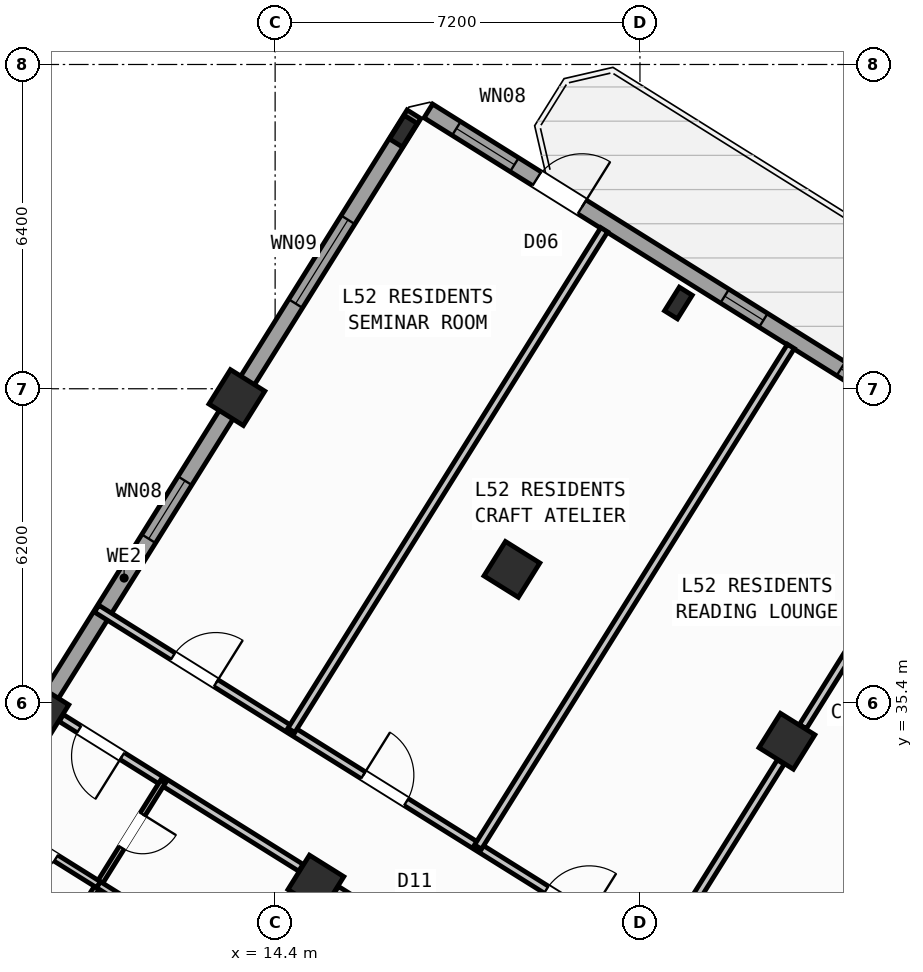
"""IFC4 building model, lengths in metres.
Left out: names, types, materials, properties, quantities, classifications, styles, units other than length and angle.
Written with IfcOpenShell. Run it as: python <this file> out.ifc"""

import sys

from ifc_helpers import new_model, si_unit, direction, frame, frame_2d, origin, origin_2d, place, context, subcontext, project, spatial, rectangle, hollow_rectangle, i_section, extrude, source, transform, mapped, element, fill, save


model = new_model("IFC4")
c1 = context("Model", 3, precision=1e-05, world=origin(), true_north=direction((0.0, 1.0)))
c2 = subcontext(c1, "Body", "Model", "MODEL_VIEW")
j1 = project(units=[si_unit("LENGTHUNIT", "METRE"), si_unit("PLANEANGLEUNIT", "RADIAN")], contexts=[c1])
p1 = place(None, origin())
s1 = spatial("IfcSite", under=j1, at=p1, CompositionType="ELEMENT")
p2 = place(p1, origin())
s2 = spatial("IfcBuilding", under=s1, at=p2, CompositionType="ELEMENT")
p3 = place(p2, frame((0.0, 0.0, 207.6)))
s3 = spatial("IfcBuildingStorey", under=s2, at=p3, CompositionType="ELEMENT", Elevation=207.6)
m1 = source(origin(), c2, "Body", "SweptSolid", [
    extrude(hollow_rectangle(XDim=0.8, YDim=0.8, WallThickness=0.032, at=origin_2d()), origin(), (0.0, 0.0, 1.0), 3.6),
])
p4 = place(p3, frame((24.5, 34.643, 0.0), z_axis=(0.0, 0.0, 1.0), x_axis=(-0.848048096156, 0.529919264233, 0.0)))
e1 = element("IfcColumn", 1, at=p4, inside=s3, PredefinedType="COLUMN", context=c2, shape_type="MappedRepresentation", body=[
    mapped(m1, transform((0.0, 0.0, 0.0), scale=1.0)),
])
m2 = source(origin(), c2, "Body", "SweptSolid", [
    extrude(i_section(OverallWidth=0.3, OverallDepth=0.55, WebThickness=0.015, FlangeThickness=0.029, at=origin_2d()), origin(), (0.0, 0.0, 1.0), 3.6),
])
p5 = place(p3, frame((22.358, 43.292, 0.0), z_axis=(0.0, 0.0, 1.0), x_axis=(-0.848048096156, 0.529919264233, 0.0)))
e2 = element("IfcColumn", 2, at=p5, inside=s3, PredefinedType="COLUMN", context=c2, shape_type="MappedRepresentation", body=[
    mapped(m2, transform((0.0, 0.0, 0.0), scale=1.0)),
])
for number, where, z_axis, x_axis in (
    (3, (19.073, 38.034, 0.0), (0.0, 0.0, 1.0), (-0.848, 0.53, 0.0)),
    (4, (15.205, 31.844, 0.0), (0.0, 0.0, 1.0), (-0.848, 0.53, 0.0)),
):
    element("IfcColumn", number, at=place(p3, frame(where, z_axis=z_axis, x_axis=x_axis)), inside=s3, PredefinedType="COLUMN", context=c2, shape_type="MappedRepresentation", body=[
        mapped(m1, transform((0.0, 0.0, 0.0), scale=1.0)),
    ])
p6 = place(p3, frame((16.931, 46.684, 0.0), z_axis=(0.0, 0.0, 1.0), x_axis=(-0.848048096156, 0.529919264233, 0.0)))
e5 = element("IfcColumn", 5, at=p6, inside=s3, PredefinedType="COLUMN", context=c2, shape_type="MappedRepresentation", body=[
    mapped(m2, transform((0.0, 0.0, 0.0), scale=1.0)),
])
for number, where, z_axis, x_axis in (
    (6, (13.646, 41.426, 0.0), (0.0, 0.0, 1.0), (-0.848, 0.53, 0.0)),
    (7, (9.777, 35.235, 0.0), (0.0, 0.0, 1.0), (-0.848, 0.53, 0.0)),
):
    element("IfcColumn", number, at=place(p3, frame(where, z_axis=z_axis, x_axis=x_axis)), inside=s3, PredefinedType="COLUMN", context=c2, shape_type="MappedRepresentation", body=[
        mapped(m1, transform((0.0, 0.0, 0.0), scale=1.0)),
    ])
p7 = place(p3, frame((5.7, 28.71, 0.0), z_axis=(0.0, 0.0, 1.0), x_axis=(0.529923711467, 0.8480453172, 0.0)))
e8 = element("IfcWall", 8, at=p7, inside=s3, PredefinedType="STANDARD", context=c2, shape_type="SweptSolid", body=[
    extrude(rectangle(XDim=21.587, YDim=0.32, at=frame_2d((10.794, 0.0))), origin(), (0.0, 0.0, 1.0), 2.825),
])
p8 = place(p7, frame((2.184, 0.0, 0.9)))
e9 = element("IfcOpeningElement", 9, at=p8, cuts=e8, PredefinedType="OPENING", context=c2, shape_type="SweptSolid", body=[
    extrude(rectangle(XDim=1.65, YDim=1.45, at=frame_2d((0.825, 0.725))), frame((0.0, 0.17, 0.0), z_axis=(0.0, -1.0, 0.0), x_axis=(1.0, 0.0, 0.0)), (0.0, 0.0, 1.0), 0.34),
])
p9 = place(p7, frame((11.709, 0.0, 0.9)))
e10 = element("IfcOpeningElement", 10, at=p9, cuts=e8, PredefinedType="OPENING", context=c2, shape_type="SweptSolid", body=[
    extrude(rectangle(XDim=1.35, YDim=1.45, at=frame_2d((0.675, 0.725))), frame((0.0, 0.17, 0.0), z_axis=(0.0, -1.0, 0.0), x_axis=(1.0, 0.0, 0.0)), (0.0, 0.0, 1.0), 0.34),
])
p10 = place(p7, frame((17.181, 0.0, 0.95)))
e11 = element("IfcOpeningElement", 11, at=p10, cuts=e8, PredefinedType="OPENING", context=c2, shape_type="SweptSolid", body=[
    extrude(rectangle(XDim=1.95, YDim=1.35, at=frame_2d((0.975, 0.675))), frame((0.0, 0.17, 0.0), z_axis=(0.0, -1.0, 0.0), x_axis=(1.0, 0.0, 0.0)), (0.0, 0.0, 1.0), 0.34),
])
p11 = place(p3, frame((17.424, 47.083, 0.0), z_axis=(0.0, 0.0, 1.0), x_axis=(0.848049927979, -0.529916332693, 0.0)))
e12 = element("IfcWall", 12, at=p11, inside=s3, PredefinedType="STANDARD", context=c2, shape_type="SweptSolid", body=[
    extrude(rectangle(XDim=29.223, YDim=0.32, at=frame_2d((14.612, 0.0))), origin(), (0.0, 0.0, 1.0), 3.35),
])
p12 = place(p11, frame((2.526, 0.0, 0.0)))
e13 = element("IfcOpeningElement", 13, at=p12, cuts=e12, PredefinedType="OPENING", context=c2, shape_type="SweptSolid", body=[
    extrude(rectangle(XDim=1.05, YDim=2.15, at=frame_2d((0.525, 1.075))), frame((0.0, 0.17, 0.0), z_axis=(0.0, -1.0, 0.0), x_axis=(1.0, 0.0, 0.0)), (0.0, 0.0, 1.0), 0.34),
])
p13 = place(p11, frame((0.653, 0.0, 0.9)))
e14 = element("IfcOpeningElement", 14, at=p13, cuts=e12, PredefinedType="OPENING", context=c2, shape_type="SweptSolid", body=[
    extrude(rectangle(XDim=1.35, YDim=1.45, at=frame_2d((0.675, 0.725))), frame((0.0, 0.17, 0.0), z_axis=(0.0, -1.0, 0.0), x_axis=(1.0, 0.0, 0.0)), (0.0, 0.0, 1.0), 0.34),
])
p14 = place(p11, frame((6.897, 0.0, 1.0)))
e15 = element("IfcOpeningElement", 15, at=p14, cuts=e12, PredefinedType="OPENING", context=c2, shape_type="SweptSolid", body=[
    extrude(rectangle(XDim=0.9, YDim=1.25, at=frame_2d((0.45, 0.625))), frame((0.0, 0.17, 0.0), z_axis=(0.0, -1.0, 0.0), x_axis=(1.0, 0.0, 0.0)), (0.0, 0.0, 1.0), 0.34),
])
p15 = place(p11, frame((9.602, 0.0, 0.95)))
e16 = element("IfcOpeningElement", 16, at=p15, cuts=e12, PredefinedType="OPENING", context=c2, shape_type="SweptSolid", body=[
    extrude(rectangle(XDim=1.95, YDim=1.35, at=frame_2d((0.975, 0.675))), frame((0.0, 0.17, 0.0), z_axis=(0.0, -1.0, 0.0), x_axis=(1.0, 0.0, 0.0)), (0.0, 0.0, 1.0), 0.34),
])
p16 = place(p11, frame((14.096, 0.0, 1.0)))
e17 = element("IfcOpeningElement", 17, at=p16, cuts=e12, PredefinedType="OPENING", context=c2, shape_type="SweptSolid", body=[
    extrude(rectangle(XDim=0.9, YDim=1.25, at=frame_2d((0.45, 0.625))), frame((0.0, 0.17, 0.0), z_axis=(0.0, -1.0, 0.0), x_axis=(1.0, 0.0, 0.0)), (0.0, 0.0, 1.0), 0.34),
])
p17 = place(p11, frame((17.254, 0.0, 1.0)))
e18 = element("IfcOpeningElement", 18, at=p17, cuts=e12, PredefinedType="OPENING", context=c2, shape_type="SweptSolid", body=[
    extrude(rectangle(XDim=0.9, YDim=1.25, at=frame_2d((0.45, 0.625))), frame((0.0, 0.17, 0.0), z_axis=(0.0, -1.0, 0.0), x_axis=(1.0, 0.0, 0.0)), (0.0, 0.0, 1.0), 0.34),
])
p18 = place(p11, frame((21.139, 0.0, 0.9)))
e19 = element("IfcOpeningElement", 19, at=p18, cuts=e12, PredefinedType="OPENING", context=c2, shape_type="SweptSolid", body=[
    extrude(rectangle(XDim=1.35, YDim=1.45, at=frame_2d((0.675, 0.725))), frame((0.0, 0.17, 0.0), z_axis=(0.0, -1.0, 0.0), x_axis=(1.0, 0.0, 0.0)), (0.0, 0.0, 1.0), 0.34),
])
p19 = place(p11, frame((25.778, 0.0, 0.9)))
e20 = element("IfcOpeningElement", 20, at=p19, cuts=e12, PredefinedType="OPENING", context=c2, shape_type="SweptSolid", body=[
    extrude(rectangle(XDim=1.35, YDim=1.45, at=frame_2d((0.675, 0.725))), frame((0.0, 0.17, 0.0), z_axis=(0.0, -1.0, 0.0), x_axis=(1.0, 0.0, 0.0)), (0.0, 0.0, 1.0), 0.34),
])
p20 = place(p3, frame((31.239, 38.274, 0.0), z_axis=(0.0, 0.0, 1.0), x_axis=(-0.529925472745, -0.848044216616, 0.0)))
e21 = element("IfcWall", 21, at=p20, inside=s3, PredefinedType="PARTITIONING", context=c2, shape_type="SweptSolid", body=[
    extrude(rectangle(XDim=11.65, YDim=0.16, at=frame_2d((5.825, 0.0))), origin(), (0.0, 0.0, 1.0), 3.34),
])
p21 = place(p3, frame((25.065, 28.394, 0.0), z_axis=(0.0, 0.0, 1.0), x_axis=(-0.848048310262, 0.529918921593, 0.0)))
e22 = element("IfcWall", 22, at=p21, inside=s3, PredefinedType="PARTITIONING", context=c2, shape_type="SweptSolid", body=[
    extrude(rectangle(XDim=16.73, YDim=0.16, at=frame_2d((8.365, 0.0))), origin(), (0.0, 0.0, 1.0), 3.34),
])
p22 = place(p21, frame((1.338, 0.0, 0.0)))
e23 = element("IfcOpeningElement", 23, at=p22, cuts=e22, PredefinedType="OPENING", context=c2, shape_type="SweptSolid", body=[
    extrude(rectangle(XDim=1.0, YDim=2.1, at=frame_2d((0.5, 1.05))), frame((0.0, 0.09, 0.0), z_axis=(0.0, -1.0, 0.0), x_axis=(1.0, 0.0, 0.0)), (0.0, 0.0, 1.0), 0.18),
])
p23 = place(p21, frame((5.265, 0.0, 0.0)))
e24 = element("IfcOpeningElement", 24, at=p23, cuts=e22, PredefinedType="OPENING", context=c2, shape_type="SweptSolid", body=[
    extrude(rectangle(XDim=1.0, YDim=2.1, at=frame_2d((0.5, 1.05))), frame((0.0, 0.09, 0.0), z_axis=(0.0, -1.0, 0.0), x_axis=(1.0, 0.0, 0.0)), (0.0, 0.0, 1.0), 0.18),
])
p24 = place(p21, frame((9.526, 0.0, 0.0)))
e25 = element("IfcOpeningElement", 25, at=p24, cuts=e22, PredefinedType="OPENING", context=c2, shape_type="SweptSolid", body=[
    extrude(rectangle(XDim=1.0, YDim=2.1, at=frame_2d((0.5, 1.05))), frame((0.0, 0.09, 0.0), z_axis=(0.0, -1.0, 0.0), x_axis=(1.0, 0.0, 0.0)), (0.0, 0.0, 1.0), 0.18),
])
p25 = place(p21, frame((13.954, 0.0, 0.0)))
e26 = element("IfcOpeningElement", 26, at=p25, cuts=e22, PredefinedType="OPENING", context=c2, shape_type="SweptSolid", body=[
    extrude(rectangle(XDim=1.0, YDim=2.1, at=frame_2d((0.5, 1.05))), frame((0.0, 0.09, 0.0), z_axis=(0.0, -1.0, 0.0), x_axis=(1.0, 0.0, 0.0)), (0.0, 0.0, 1.0), 0.18),
])
p26 = place(p3, frame((20.336, 28.755, 0.0), z_axis=(0.0, 0.0, 1.0), x_axis=(-0.848049955116, 0.529916289265, 0.0)))
e27 = element("IfcWall", 27, at=p26, inside=s3, PredefinedType="PARTITIONING", context=c2, shape_type="SweptSolid", body=[
    extrude(rectangle(XDim=5.576, YDim=0.16, at=frame_2d((2.788, 0.0))), origin(), (0.0, 0.0, 1.0), 2.825),
])
p27 = place(p26, frame((3.618, 0.0, 0.0)))
e28 = element("IfcOpeningElement", 28, at=p27, cuts=e27, PredefinedType="OPENING", context=c2, shape_type="SweptSolid", body=[
    extrude(rectangle(XDim=1.0, YDim=2.1, at=frame_2d((0.5, 1.05))), frame((0.0, 0.09, 0.0), z_axis=(0.0, -1.0, 0.0), x_axis=(1.0, 0.0, 0.0)), (0.0, 0.0, 1.0), 0.18),
])
p28 = place(p3, frame((14.908, 32.147, 0.0), z_axis=(0.0, 0.0, 1.0), x_axis=(-0.848049955116, 0.529916289265, 0.0)))
e29 = element("IfcWall", 29, at=p28, inside=s3, PredefinedType="PARTITIONING", context=c2, shape_type="SweptSolid", body=[
    extrude(rectangle(XDim=5.576, YDim=0.16, at=frame_2d((2.788, 0.0))), origin(), (0.0, 0.0, 1.0), 2.825),
])
p29 = place(p28, frame((4.158, 0.0, 0.0)))
e30 = element("IfcOpeningElement", 30, at=p29, cuts=e29, PredefinedType="OPENING", context=c2, shape_type="SweptSolid", body=[
    extrude(rectangle(XDim=1.0, YDim=2.1, at=frame_2d((0.5, 1.05))), frame((0.0, 0.09, 0.0), z_axis=(0.0, -1.0, 0.0), x_axis=(1.0, 0.0, 0.0)), (0.0, 0.0, 1.0), 0.18),
])
p30 = place(p3, frame((12.188, 33.847, 0.0), z_axis=(0.0, 0.0, 1.0), x_axis=(-0.529917860021, -0.848048973604, 0.0)))
e31 = element("IfcWall", 31, at=p30, inside=s3, PredefinedType="PARTITIONING", context=c2, shape_type="SweptSolid", body=[
    extrude(rectangle(XDim=8.12, YDim=0.11, at=frame_2d((4.06, 0.0))), origin(), (0.0, 0.0, 1.0), 3.34),
])
p31 = place(p30, frame((0.76, 0.0, 0.0)))
e32 = element("IfcOpeningElement", 32, at=p31, cuts=e31, PredefinedType="OPENING", context=c2, shape_type="SweptSolid", body=[
    extrude(rectangle(XDim=0.78, YDim=2.05, at=frame_2d((0.39, 1.025))), frame((0.0, 0.065, 0.0), z_axis=(0.0, -1.0, 0.0), x_axis=(1.0, 0.0, 0.0)), (0.0, 0.0, 1.0), 0.13),
])
p32 = place(p30, frame((4.8, 0.0, 0.0)))
e33 = element("IfcOpeningElement", 33, at=p32, cuts=e31, PredefinedType="OPENING", context=c2, shape_type="SweptSolid", body=[
    extrude(rectangle(XDim=0.92, YDim=2.08, at=frame_2d((0.46, 1.04))), frame((0.0, 0.065, 0.0), z_axis=(0.0, -1.0, 0.0), x_axis=(1.0, 0.0, 0.0)), (0.0, 0.0, 1.0), 0.13),
])
p33 = place(p3, frame((10.916, 31.811, 0.0), z_axis=(0.0, 0.0, 1.0), x_axis=(-0.84802195137, 0.529961102341, 0.0)))
e34 = element("IfcWall", 34, at=p33, inside=s3, PredefinedType="PLUMBINGWALL", context=c2, shape_type="SweptSolid", body=[
    extrude(rectangle(XDim=2.9, YDim=0.14, at=frame_2d((1.45, 0.0))), origin(), (0.0, 0.0, 1.0), 3.34),
])
p34 = place(p33, frame((0.99, 0.0, 0.0)))
e35 = element("IfcOpeningElement", 35, at=p34, cuts=e34, PredefinedType="OPENING", context=c2, shape_type="SweptSolid", body=[
    extrude(rectangle(XDim=0.92, YDim=2.08, at=frame_2d((0.46, 1.04))), frame((0.0, 0.08, 0.0), z_axis=(0.0, -1.0, 0.0), x_axis=(1.0, 0.0, 0.0)), (0.0, 0.0, 1.0), 0.16),
])
p35 = place(p3, frame((13.986, 29.893, 0.0), z_axis=(0.0, 0.0, 1.0), x_axis=(-0.848051346257, 0.52991406295, 0.0)))
e36 = element("IfcWall", 36, at=p35, inside=s3, PredefinedType="PLUMBINGWALL", context=c2, shape_type="SweptSolid", body=[
    extrude(rectangle(XDim=3.62, YDim=0.14, at=frame_2d((1.81, 0.0))), origin(), (0.0, 0.0, 1.0), 3.34),
])
p36 = place(p3, frame((27.73, 39.597, 0.0), z_axis=(0.0, 0.0, 1.0), x_axis=(-0.529919150083, -0.848048167486, 0.0)))
e37 = element("IfcWall", 37, at=p36, inside=s3, PredefinedType="PARTITIONING", context=c2, shape_type="SweptSolid", body=[
    extrude(rectangle(XDim=5.501, YDim=0.16, at=frame_2d((2.75, 0.0))), origin(), (0.0, 0.0, 1.0), 2.825),
])
p37 = place(p3, frame((24.379, 34.233, 0.0), z_axis=(0.0, 0.0, 1.0), x_axis=(-0.529922402838, -0.84804613493, 0.0)))
e38 = element("IfcWall", 38, at=p37, inside=s3, PredefinedType="PARTITIONING", context=c2, shape_type="SweptSolid", body=[
    extrude(rectangle(XDim=4.588, YDim=0.16, at=frame_2d((2.294, 0.0))), origin(), (0.0, 0.0, 1.0), 2.825),
])
for number, where, z_axis, x_axis in (
    (39, (24.578, 42.436, 0.0), (0.0, 0.0, 1.0), (-0.53, -0.848, 0.0)),
    (40, (20.894, 44.738, 0.0), (0.0, 0.0, 1.0), (-0.53, -0.848, 0.0)),
):
    element("IfcWall", number, at=place(p3, frame(where, z_axis=z_axis, x_axis=x_axis)), inside=s3, PredefinedType="PARTITIONING", context=c2, shape_type="SweptSolid", body=[
        extrude(rectangle(XDim=11.65, YDim=0.16, at=frame_2d((5.825, 0.0))), origin(), (0.0, 0.0, 1.0), 2.995),
    ])
m3 = source(origin(), c2, "Body", "SweptSolid", [
    extrude(rectangle(XDim=1.05, YDim=2.15, at=frame_2d((0.525, 1.075))), frame((0.0, 0.025, 0.0), z_axis=(0.0, -1.0, 0.0), x_axis=(1.0, 0.0, 0.0)), (0.0, 0.0, 1.0), 0.05),
])
p38 = place(p12, origin())
e41 = element("IfcDoor", 41, at=p38, inside=s3, OperationType="SINGLE_SWING_RIGHT", PredefinedType="DOOR", context=c2, shape_type="MappedRepresentation", body=[
    mapped(m3, transform((0.0, 0.0, 0.0), scale=1.0)),
])
fill(e13, e41)
m4 = source(origin(), c2, "Body", "SweptSolid", [
    extrude(rectangle(XDim=1.35, YDim=1.45, at=frame_2d((0.675, 0.725))), frame((0.0, 0.03, 0.0), z_axis=(0.0, -1.0, 0.0), x_axis=(1.0, 0.0, 0.0)), (0.0, 0.0, 1.0), 0.06),
])
p39 = place(p9, origin())
e42 = element("IfcWindow", 42, at=p39, inside=s3, PartitioningType="SINGLE_PANEL", PredefinedType="WINDOW", context=c2, shape_type="MappedRepresentation", body=[
    mapped(m4, transform((0.0, 0.0, 0.0), scale=1.0)),
])
fill(e10, e42)
m5 = source(origin(), c2, "Body", "SweptSolid", [
    extrude(rectangle(XDim=1.95, YDim=1.35, at=frame_2d((0.975, 0.675))), frame((0.0, 0.03, 0.0), z_axis=(0.0, -1.0, 0.0), x_axis=(1.0, 0.0, 0.0)), (0.0, 0.0, 1.0), 0.06),
])
p40 = place(p10, origin())
e43 = element("IfcWindow", 43, at=p40, inside=s3, PartitioningType="SINGLE_PANEL", PredefinedType="WINDOW", context=c2, shape_type="MappedRepresentation", body=[
    mapped(m5, transform((0.0, 0.0, 0.0), scale=1.0)),
])
fill(e11, e43)
p41 = place(p13, origin())
e44 = element("IfcWindow", 44, at=p41, inside=s3, PartitioningType="SINGLE_PANEL", PredefinedType="WINDOW", context=c2, shape_type="MappedRepresentation", body=[
    mapped(m4, transform((0.0, 0.0, 0.0), scale=1.0)),
])
fill(e14, e44)
m6 = source(origin(), c2, "Body", "SweptSolid", [
    extrude(rectangle(XDim=0.9, YDim=1.25, at=frame_2d((0.45, 0.625))), frame((0.0, 0.03, 0.0), z_axis=(0.0, -1.0, 0.0), x_axis=(1.0, 0.0, 0.0)), (0.0, 0.0, 1.0), 0.06),
])
p42 = place(p14, origin())
e45 = element("IfcWindow", 45, at=p42, inside=s3, PartitioningType="SINGLE_PANEL", PredefinedType="WINDOW", context=c2, shape_type="MappedRepresentation", body=[
    mapped(m6, transform((0.0, 0.0, 0.0), scale=1.0)),
])
fill(e15, e45)
p43 = place(p15, origin())
e46 = element("IfcWindow", 46, at=p43, inside=s3, PartitioningType="SINGLE_PANEL", PredefinedType="WINDOW", context=c2, shape_type="MappedRepresentation", body=[
    mapped(m5, transform((0.0, 0.0, 0.0), scale=1.0)),
])
fill(e16, e46)
m7 = source(origin(), c2, "Body", "SweptSolid", [
    extrude(rectangle(XDim=1.0, YDim=2.1, at=frame_2d((0.5, 1.05))), frame((0.0, 0.025, 0.0), z_axis=(0.0, -1.0, 0.0), x_axis=(1.0, 0.0, 0.0)), (0.0, 0.0, 1.0), 0.05),
])
p44 = place(p29, origin())
e47 = element("IfcDoor", 47, at=p44, inside=s3, OperationType="SINGLE_SWING_LEFT", PredefinedType="DOOR", context=c2, shape_type="MappedRepresentation", body=[
    mapped(m7, transform((0.0, 0.0, 0.0), scale=1.0)),
])
fill(e30, e47)
m8 = source(origin(), c2, "Body", "SweptSolid", [
    extrude(rectangle(XDim=0.92, YDim=2.08, at=frame_2d((0.46, 1.04))), frame((0.0, 0.025, 0.0), z_axis=(0.0, -1.0, 0.0), x_axis=(1.0, 0.0, 0.0)), (0.0, 0.0, 1.0), 0.05),
])
p45 = place(p34, origin())
e48 = element("IfcDoor", 48, at=p45, inside=s3, OperationType="SINGLE_SWING_RIGHT", PredefinedType="DOOR", context=c2, shape_type="MappedRepresentation", body=[
    mapped(m8, transform((0.0, 0.0, 0.0), scale=1.0)),
])
fill(e35, e48)
m9 = source(origin(), c2, "Body", "SweptSolid", [
    extrude(rectangle(XDim=0.78, YDim=2.05, at=frame_2d((0.39, 1.025))), frame((0.0, 0.025, 0.0), z_axis=(0.0, -1.0, 0.0), x_axis=(1.0, 0.0, 0.0)), (0.0, 0.0, 1.0), 0.05),
])
p46 = place(p31, origin())
e49 = element("IfcDoor", 49, at=p46, inside=s3, OperationType="SINGLE_SWING_LEFT", PredefinedType="DOOR", context=c2, shape_type="MappedRepresentation", body=[
    mapped(m9, transform((0.0, 0.0, 0.0), scale=1.0)),
])
fill(e32, e49)
p47 = place(p23, frame((1.0, 0.0, 0.0), z_axis=(0.0, 0.0, 1.0), x_axis=(-1.0, 0.0, 0.0)))
e50 = element("IfcDoor", 50, at=p47, inside=s3, OperationType="SINGLE_SWING_RIGHT", PredefinedType="DOOR", context=c2, shape_type="MappedRepresentation", body=[
    mapped(m7, transform((0.0, 0.0, 0.0), scale=1.0)),
])
fill(e24, e50)
p48 = place(p24, frame((1.0, 0.0, 0.0), z_axis=(0.0, 0.0, 1.0), x_axis=(-1.0, 0.0, 0.0)))
e51 = element("IfcDoor", 51, at=p48, inside=s3, OperationType="SINGLE_SWING_LEFT", PredefinedType="DOOR", context=c2, shape_type="MappedRepresentation", body=[
    mapped(m7, transform((0.0, 0.0, 0.0), scale=1.0)),
])
fill(e25, e51)
p49 = place(p25, frame((1.0, 0.0, 0.0), z_axis=(0.0, 0.0, 1.0), x_axis=(-1.0, 0.0, 0.0)))
e52 = element("IfcDoor", 52, at=p49, inside=s3, OperationType="SINGLE_SWING_RIGHT", PredefinedType="DOOR", context=c2, shape_type="MappedRepresentation", body=[
    mapped(m7, transform((0.0, 0.0, 0.0), scale=1.0)),
])
fill(e26, e52)
save(model, sys.argv[1])
